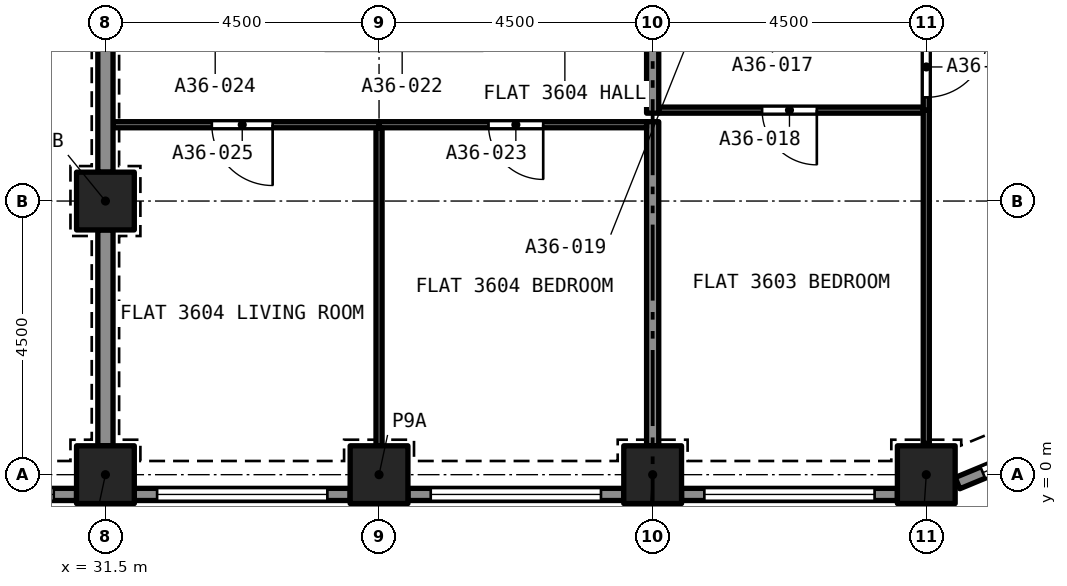
"""IFC4 building model, lengths in metres.
Left out: names, types, materials, properties, quantities, classifications, styles, units other than length and angle.
Written with IfcOpenShell. Run it as: python <this file> out.ifc"""

import sys

from ifc_helpers import new_model, si_unit, direction, frame, frame_2d, origin, origin_2d, place, context, subcontext, project, spatial, rectangle, extrude, element, fill, save


model = new_model("IFC4")
c1 = context("Model", 3, precision=1e-05, world=origin(), true_north=direction((0.0, 1.0)))
c2 = subcontext(c1, "Body", "Model", "MODEL_VIEW")
j1 = project(units=[si_unit("LENGTHUNIT", "METRE"), si_unit("PLANEANGLEUNIT", "RADIAN")], contexts=[c1])
p1 = place(None, origin())
s1 = spatial("IfcSite", under=j1, at=p1, CompositionType="ELEMENT")
p2 = place(p1, origin())
s2 = spatial("IfcBuilding", under=s1, at=p2, CompositionType="ELEMENT")
p3 = place(p2, frame((0.0, 0.0, 130.2)))
s3 = spatial("IfcBuildingStorey", under=s2, at=p3, CompositionType="ELEMENT", Elevation=130.2)
for number, where, z_axis, x_axis in (
    (1, (31.5, 0.0, 0.0), (0.0, 0.0, 1.0), (1.0, 0.0, 0.0)),
    (2, (36.0, 0.0, 0.0), (0.0, 0.0, 1.0), (1.0, 0.0, 0.0)),
    (3, (40.5, 0.0, 0.0), (0.0, 0.0, 1.0), (1.0, 0.0, 0.0)),
    (4, (45.0, 0.0, 0.0), (0.0, 0.0, 1.0), (1.0, 0.0, 0.0)),
    (5, (31.5, 4.5, 0.0), (0.0, 0.0, 1.0), (1.0, 0.0, 0.0)),
):
    element("IfcColumn", number, at=place(p3, frame(where, z_axis=z_axis, x_axis=x_axis)), inside=s3, PredefinedType="COLUMN", context=c2, shape_type="SweptSolid", body=[
        extrude(rectangle(XDim=0.95, YDim=0.95, at=origin_2d()), origin(), (0.0, 0.0, 1.0), 3.2),
    ])
p4 = place(p3, frame((31.025, -0.325, 0.0), z_axis=(0.0, 0.0, 1.0), x_axis=(-1.0, 0.0, 0.0)))
e6 = element("IfcWall", 6, at=p4, inside=s3, PredefinedType="SOLIDWALL", context=c2, shape_type="SweptSolid", body=[
    extrude(rectangle(XDim=3.55, YDim=0.2, at=frame_2d((1.775, 0.0))), origin(), (0.0, 0.0, 1.0), 3.2),
])
p5 = place(p4, frame((0.375, 0.0, 0.45)))
e7 = element("IfcOpeningElement", 7, at=p5, cuts=e6, PredefinedType="OPENING", context=c2, shape_type="SweptSolid", body=[
    extrude(rectangle(XDim=2.8, YDim=1.95, at=frame_2d((1.4, 0.975))), frame((0.0, 0.11, 0.0), z_axis=(0.0, -1.0, 0.0), x_axis=(1.0, 0.0, 0.0)), (0.0, 0.0, 1.0), 0.22),
])
p6 = place(p3, frame((35.525, -0.325, 0.0), z_axis=(0.0, 0.0, 1.0), x_axis=(-1.0, 0.0, 0.0)))
e8 = element("IfcWall", 8, at=p6, inside=s3, PredefinedType="SOLIDWALL", context=c2, shape_type="SweptSolid", body=[
    extrude(rectangle(XDim=3.55, YDim=0.2, at=frame_2d((1.775, 0.0))), origin(), (0.0, 0.0, 1.0), 3.2),
])
p7 = place(p6, frame((0.375, 0.0, 0.45)))
e9 = element("IfcOpeningElement", 9, at=p7, cuts=e8, PredefinedType="OPENING", context=c2, shape_type="SweptSolid", body=[
    extrude(rectangle(XDim=2.8, YDim=1.95, at=frame_2d((1.4, 0.975))), frame((0.0, 0.11, 0.0), z_axis=(0.0, -1.0, 0.0), x_axis=(1.0, 0.0, 0.0)), (0.0, 0.0, 1.0), 0.22),
])
p8 = place(p3, frame((40.025, -0.325, 0.0), z_axis=(0.0, 0.0, 1.0), x_axis=(-1.0, 0.0, 0.0)))
e10 = element("IfcWall", 10, at=p8, inside=s3, PredefinedType="SOLIDWALL", context=c2, shape_type="SweptSolid", body=[
    extrude(rectangle(XDim=3.55, YDim=0.2, at=frame_2d((1.775, 0.0))), origin(), (0.0, 0.0, 1.0), 3.2),
])
p9 = place(p8, frame((0.375, 0.0, 0.45)))
e11 = element("IfcOpeningElement", 11, at=p9, cuts=e10, PredefinedType="OPENING", context=c2, shape_type="SweptSolid", body=[
    extrude(rectangle(XDim=2.8, YDim=1.95, at=frame_2d((1.4, 0.975))), frame((0.0, 0.11, 0.0), z_axis=(0.0, -1.0, 0.0), x_axis=(1.0, 0.0, 0.0)), (0.0, 0.0, 1.0), 0.22),
])
p10 = place(p3, frame((44.525, -0.325, 0.0), z_axis=(0.0, 0.0, 1.0), x_axis=(-1.0, 0.0, 0.0)))
e12 = element("IfcWall", 12, at=p10, inside=s3, PredefinedType="SOLIDWALL", context=c2, shape_type="SweptSolid", body=[
    extrude(rectangle(XDim=3.55, YDim=0.2, at=frame_2d((1.775, 0.0))), origin(), (0.0, 0.0, 1.0), 3.2),
])
p11 = place(p10, frame((0.375, 0.0, 0.45)))
e13 = element("IfcOpeningElement", 13, at=p11, cuts=e12, PredefinedType="OPENING", context=c2, shape_type="SweptSolid", body=[
    extrude(rectangle(XDim=2.8, YDim=1.95, at=frame_2d((1.4, 0.975))), frame((0.0, 0.11, 0.0), z_axis=(0.0, -1.0, 0.0), x_axis=(1.0, 0.0, 0.0)), (0.0, 0.0, 1.0), 0.22),
])
p12 = place(p3, frame((47.733, 0.78, 0.0), z_axis=(0.0, 0.0, 1.0), x_axis=(-0.923880599843, -0.382680855588, 0.0)))
e14 = element("IfcWall", 14, at=p12, inside=s3, PredefinedType="SOLIDWALL", context=c2, shape_type="SweptSolid", body=[
    extrude(rectangle(XDim=2.403, YDim=0.2, at=frame_2d((1.201, 0.0))), origin(), (0.0, 0.0, 1.0), 3.2),
])
p13 = place(p12, frame((0.251, 0.0, 0.45)))
e15 = element("IfcOpeningElement", 15, at=p13, cuts=e14, PredefinedType="OPENING", context=c2, shape_type="SweptSolid", body=[
    extrude(rectangle(XDim=1.7, YDim=1.95, at=frame_2d((0.85, 0.975))), frame((0.0, 0.11, 0.0), z_axis=(0.0, -1.0, 0.0), x_axis=(1.0, 0.0, 0.0)), (0.0, 0.0, 1.0), 0.22),
])
p14 = place(p3, frame((44.95, 5.995, 0.0), z_axis=(0.0, 0.0, 1.0), x_axis=(-1.0, 0.0, 0.0)))
e16 = element("IfcWall", 16, at=p14, inside=s3, PredefinedType="PARTITIONING", context=c2, shape_type="SweptSolid", body=[
    extrude(rectangle(XDim=4.35, YDim=0.1, at=frame_2d((2.175, 0.0))), origin(), (0.0, 0.0, 1.0), 2.9),
])
p15 = place(p14, frame((1.75, 0.0, 0.0)))
e17 = element("IfcOpeningElement", 17, at=p15, cuts=e16, PredefinedType="OPENING", context=c2, shape_type="SweptSolid", body=[
    extrude(rectangle(XDim=0.9, YDim=2.1, at=frame_2d((0.45, 1.05))), frame((0.0, 0.06, 0.0), z_axis=(0.0, -1.0, 0.0), x_axis=(1.0, 0.0, 0.0)), (0.0, 0.0, 1.0), 0.12),
])
p16 = place(p3, frame((45.0, 0.514, 0.0), z_axis=(0.0, 0.0, 1.0), x_axis=(0.0, 1.0, 0.0)))
e18 = element("IfcWall", 18, at=p16, inside=s3, PredefinedType="PARTITIONING", context=c2, shape_type="SweptSolid", body=[
    extrude(rectangle(XDim=5.481, YDim=0.1, at=frame_2d((2.74, 0.0))), origin(), (0.0, 0.0, 1.0), 2.9),
])
p17 = place(p3, frame((40.5, 0.475, 0.0), z_axis=(0.0, 0.0, 1.0), x_axis=(0.0, 1.0, 0.0)))
e19 = element("IfcWall", 19, at=p17, inside=s3, PredefinedType="PARTITIONING", context=c2, shape_type="SweptSolid", body=[
    extrude(rectangle(XDim=5.33, YDim=0.2, at=frame_2d((2.665, 0.0))), origin(), (0.0, 0.0, 1.0), 2.9),
])
p18 = place(p3, frame((45.0, 13.9, 0.0), z_axis=(0.0, 0.0, 1.0), x_axis=(0.0, -1.0, 0.0)))
e20 = element("IfcWall", 20, at=p18, inside=s3, PredefinedType="PARTITIONING", context=c2, shape_type="SweptSolid", body=[
    extrude(rectangle(XDim=7.905, YDim=0.1, at=frame_2d((3.952, 0.0))), origin(), (0.0, 0.0, 1.0), 2.9),
])
p19 = place(p18, frame((6.695, 0.0, 0.0)))
e21 = element("IfcOpeningElement", 21, at=p19, cuts=e20, PredefinedType="OPENING", context=c2, shape_type="SweptSolid", body=[
    extrude(rectangle(XDim=1.0, YDim=2.1, at=frame_2d((0.5, 1.05))), frame((0.0, 0.06, 0.0), z_axis=(0.0, -1.0, 0.0), x_axis=(1.0, 0.0, 0.0)), (0.0, 0.0, 1.0), 0.12),
])
p20 = place(p3, frame((40.5, 5.945, 0.0), z_axis=(0.0, 0.0, 1.0), x_axis=(0.0, 1.0, 0.0)))
e22 = element("IfcWall", 22, at=p20, inside=s3, PredefinedType="PARTITIONING", context=c2, shape_type="SweptSolid", body=[
    extrude(rectangle(XDim=7.955, YDim=0.2, at=frame_2d((3.978, 0.0))), origin(), (0.0, 0.0, 1.0), 2.9),
])
p21 = place(p3, frame((40.4, 5.755, 0.0), z_axis=(0.0, 0.0, 1.0), x_axis=(-1.0, 0.0, 0.0)))
e23 = element("IfcWall", 23, at=p21, inside=s3, PredefinedType="PARTITIONING", context=c2, shape_type="SweptSolid", body=[
    extrude(rectangle(XDim=4.4, YDim=0.1, at=frame_2d((2.2, 0.0))), origin(), (0.0, 0.0, 1.0), 2.9),
])
p22 = place(p21, frame((1.7, 0.0, 0.0)))
e24 = element("IfcOpeningElement", 24, at=p22, cuts=e23, PredefinedType="OPENING", context=c2, shape_type="SweptSolid", body=[
    extrude(rectangle(XDim=0.9, YDim=2.1, at=frame_2d((0.45, 1.05))), frame((0.0, 0.06, 0.0), z_axis=(0.0, -1.0, 0.0), x_axis=(1.0, 0.0, 0.0)), (0.0, 0.0, 1.0), 0.12),
])
p23 = place(p3, frame((36.0, 0.475, 0.0), z_axis=(0.0, 0.0, 1.0), x_axis=(0.0, 1.0, 0.0)))
e25 = element("IfcWall", 25, at=p23, inside=s3, PredefinedType="PARTITIONING", context=c2, shape_type="SweptSolid", body=[
    extrude(rectangle(XDim=5.23, YDim=0.1, at=frame_2d((2.615, 0.0))), origin(), (0.0, 0.0, 1.0), 2.9),
])
p24 = place(p3, frame((36.0, 5.755, 0.0), z_axis=(0.0, 0.0, 1.0), x_axis=(-1.0, 0.0, 0.0)))
e26 = element("IfcWall", 26, at=p24, inside=s3, PredefinedType="PARTITIONING", context=c2, shape_type="SweptSolid", body=[
    extrude(rectangle(XDim=4.375, YDim=0.1, at=frame_2d((2.188, 0.0))), origin(), (0.0, 0.0, 1.0), 2.9),
])
p25 = place(p24, frame((1.75, 0.0, 0.0)))
e27 = element("IfcOpeningElement", 27, at=p25, cuts=e26, PredefinedType="OPENING", context=c2, shape_type="SweptSolid", body=[
    extrude(rectangle(XDim=1.0, YDim=2.1, at=frame_2d((0.5, 1.05))), frame((0.0, 0.06, 0.0), z_axis=(0.0, -1.0, 0.0), x_axis=(1.0, 0.0, 0.0)), (0.0, 0.0, 1.0), 0.12),
])
for number, where, z_axis, x_axis in (
    (28, (31.5, 0.475, 0.0), (0.0, 0.0, 1.0), (0.0, 1.0, 0.0)),
    (29, (31.5, 4.975, 0.0), (0.0, 0.0, 1.0), (0.0, 1.0, 0.0)),
):
    element("IfcWall", number, at=place(p3, frame(where, z_axis=z_axis, x_axis=x_axis)), inside=s3, PredefinedType="PARTITIONING", context=c2, shape_type="SweptSolid", body=[
        extrude(rectangle(XDim=3.55, YDim=0.25, at=frame_2d((1.775, 0.0))), origin(), (0.0, 0.0, 1.0), 2.38),
    ])
p26 = place(p5, origin())
e30 = element("IfcWindow", 30, at=p26, inside=s3, PartitioningType="SINGLE_PANEL", PredefinedType="WINDOW", context=c2, shape_type="SweptSolid", body=[
    extrude(rectangle(XDim=2.8, YDim=1.95, at=frame_2d((1.4, 0.975))), frame((0.0, 0.03, 0.0), z_axis=(0.0, -1.0, 0.0), x_axis=(1.0, 0.0, 0.0)), (0.0, 0.0, 1.0), 0.06),
])
fill(e7, e30)
p27 = place(p7, origin())
e31 = element("IfcWindow", 31, at=p27, inside=s3, PartitioningType="SINGLE_PANEL", PredefinedType="WINDOW", context=c2, shape_type="SweptSolid", body=[
    extrude(rectangle(XDim=2.8, YDim=1.95, at=frame_2d((1.4, 0.975))), frame((0.0, 0.03, 0.0), z_axis=(0.0, -1.0, 0.0), x_axis=(1.0, 0.0, 0.0)), (0.0, 0.0, 1.0), 0.06),
])
fill(e9, e31)
p28 = place(p9, origin())
e32 = element("IfcWindow", 32, at=p28, inside=s3, PartitioningType="SINGLE_PANEL", PredefinedType="WINDOW", context=c2, shape_type="SweptSolid", body=[
    extrude(rectangle(XDim=2.8, YDim=1.95, at=frame_2d((1.4, 0.975))), frame((0.0, 0.03, 0.0), z_axis=(0.0, -1.0, 0.0), x_axis=(1.0, 0.0, 0.0)), (0.0, 0.0, 1.0), 0.06),
])
fill(e11, e32)
p29 = place(p11, origin())
e33 = element("IfcWindow", 33, at=p29, inside=s3, PartitioningType="SINGLE_PANEL", PredefinedType="WINDOW", context=c2, shape_type="SweptSolid", body=[
    extrude(rectangle(XDim=2.8, YDim=1.95, at=frame_2d((1.4, 0.975))), frame((0.0, 0.03, 0.0), z_axis=(0.0, -1.0, 0.0), x_axis=(1.0, 0.0, 0.0)), (0.0, 0.0, 1.0), 0.06),
])
fill(e13, e33)
p30 = place(p13, origin())
e34 = element("IfcWindow", 34, at=p30, inside=s3, PartitioningType="SINGLE_PANEL", PredefinedType="WINDOW", context=c2, shape_type="SweptSolid", body=[
    extrude(rectangle(XDim=1.7, YDim=1.95, at=frame_2d((0.85, 0.975))), frame((0.0, 0.03, 0.0), z_axis=(0.0, -1.0, 0.0), x_axis=(1.0, 0.0, 0.0)), (0.0, 0.0, 1.0), 0.06),
])
fill(e15, e34)
p31 = place(p15, origin())
e35 = element("IfcDoor", 35, at=p31, inside=s3, OperationType="SINGLE_SWING_RIGHT", PredefinedType="DOOR", context=c2, shape_type="SweptSolid", body=[
    extrude(rectangle(XDim=0.9, YDim=2.1, at=frame_2d((0.45, 1.05))), frame((0.0, 0.025, 0.0), z_axis=(0.0, -1.0, 0.0), x_axis=(1.0, 0.0, 0.0)), (0.0, 0.0, 1.0), 0.05),
])
fill(e17, e35)
p32 = place(p19, origin())
e36 = element("IfcDoor", 36, at=p32, inside=s3, OperationType="SINGLE_SWING_RIGHT", PredefinedType="DOOR", context=c2, shape_type="SweptSolid", body=[
    extrude(rectangle(XDim=1.0, YDim=2.1, at=frame_2d((0.5, 1.05))), frame((0.0, 0.025, 0.0), z_axis=(0.0, -1.0, 0.0), x_axis=(1.0, 0.0, 0.0)), (0.0, 0.0, 1.0), 0.05),
])
fill(e21, e36)
p33 = place(p22, origin())
e37 = element("IfcDoor", 37, at=p33, inside=s3, OperationType="SINGLE_SWING_LEFT", PredefinedType="DOOR", context=c2, shape_type="SweptSolid", body=[
    extrude(rectangle(XDim=0.9, YDim=2.1, at=frame_2d((0.45, 1.05))), frame((0.0, 0.025, 0.0), z_axis=(0.0, -1.0, 0.0), x_axis=(1.0, 0.0, 0.0)), (0.0, 0.0, 1.0), 0.05),
])
fill(e24, e37)
p34 = place(p25, origin())
e38 = element("IfcDoor", 38, at=p34, inside=s3, OperationType="SINGLE_SWING_RIGHT", PredefinedType="DOOR", context=c2, shape_type="SweptSolid", body=[
    extrude(rectangle(XDim=1.0, YDim=2.1, at=frame_2d((0.5, 1.05))), frame((0.0, 0.025, 0.0), z_axis=(0.0, -1.0, 0.0), x_axis=(1.0, 0.0, 0.0)), (0.0, 0.0, 1.0), 0.05),
])
fill(e27, e38)
save(model, sys.argv[1])
